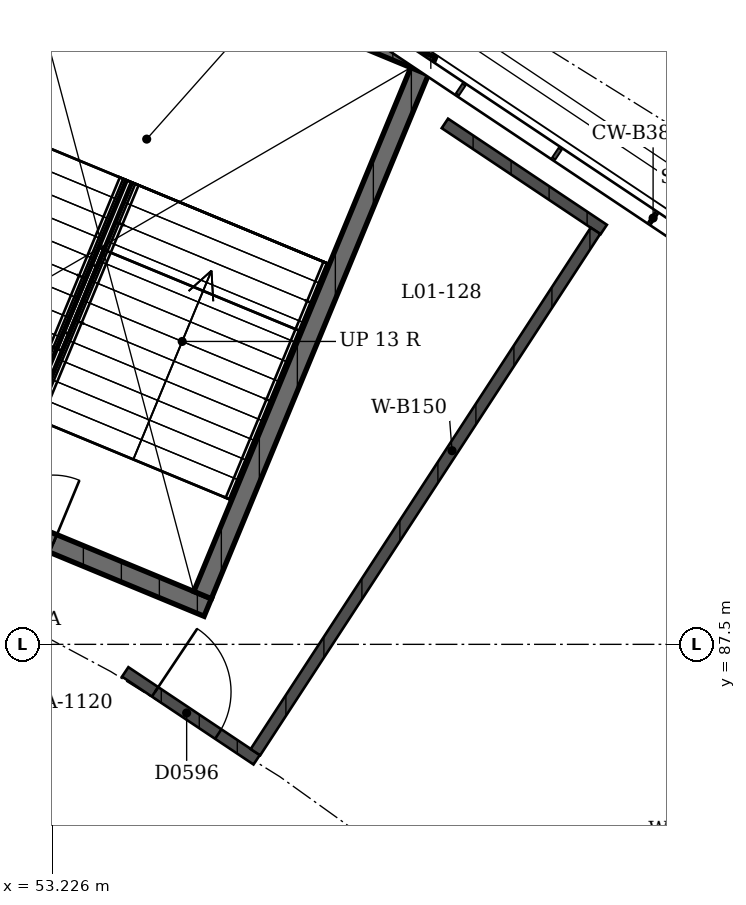
"""IFC4 building model, lengths in metres.
Left out: names, types, materials, properties, quantities, classifications, styles, units other than length and angle.
Written with IfcOpenShell. Run it as: python <this file> out.ifc"""

import sys

from ifc_helpers import new_model, si_unit, direction, frame, frame_2d, origin, place, context, subcontext, project, spatial, rectangle, extrude, element, fill, save


model = new_model("IFC4")
c1 = context("Model", 3, precision=1e-05, world=origin(), true_north=direction((0.0, 1.0)))
c2 = subcontext(c1, "Body", "Model", "MODEL_VIEW")
j1 = project(units=[si_unit("LENGTHUNIT", "METRE"), si_unit("PLANEANGLEUNIT", "RADIAN")], contexts=[c1])
p1 = place(None, origin())
s1 = spatial("IfcSite", under=j1, at=p1, CompositionType="ELEMENT")
p2 = place(p1, origin())
s2 = spatial("IfcBuilding", under=s1, at=p2, CompositionType="ELEMENT")
p3 = place(p2, frame((0.0, 0.0, 4.5)))
s3 = spatial("IfcBuildingStorey", under=s2, at=p3, CompositionType="ELEMENT", Elevation=4.5)
p4 = place(p3, frame((55.274, 87.985, 0.0), z_axis=(0.0, 0.0, 1.0), x_axis=(-0.923877480578, 0.382688386133, 0.0)))
e1 = element("IfcWall", 1, at=p4, inside=s3, PredefinedType="SHEAR", context=c2, shape_type="SweptSolid", body=[
    extrude(rectangle(XDim=12.15, YDim=0.25, at=frame_2d((6.075, 0.0))), origin(), (0.0, 0.0, 1.0), 4.09),
])
p5 = place(p4, frame((2.2, 0.0, 0.0)))
e2 = element("IfcOpeningElement", 2, at=p5, cuts=e1, PredefinedType="OPENING", context=c2, shape_type="SweptSolid", body=[
    extrude(rectangle(XDim=1.8, YDim=2.1, at=frame_2d((0.9, 1.05))), frame((0.0, 0.125, 0.0), z_axis=(0.0, -1.0, 0.0), x_axis=(1.0, 0.0, 0.0)), (0.0, 0.0, 1.0), 0.25),
])
p6 = place(p4, frame((8.15, 0.0, 0.0)))
e3 = element("IfcOpeningElement", 3, at=p6, cuts=e1, PredefinedType="OPENING", context=c2, shape_type="SweptSolid", body=[
    extrude(rectangle(XDim=1.8, YDim=2.1, at=frame_2d((0.9, 1.05))), frame((0.0, 0.125, 0.0), z_axis=(0.0, -1.0, 0.0), x_axis=(1.0, 0.0, 0.0)), (0.0, 0.0, 1.0), 0.25),
])
p7 = place(p3, frame((58.224, 95.108, 0.0), z_axis=(0.0, 0.0, 1.0), x_axis=(-0.923884584817, 0.382671234792, 0.0)))
e4 = element("IfcWall", 4, at=p7, inside=s3, PredefinedType="SHEAR", context=c2, shape_type="SweptSolid", body=[
    extrude(rectangle(XDim=12.15, YDim=0.25, at=frame_2d((6.075, 0.0))), origin(), (0.0, 0.0, 1.0), 4.09),
])
p8 = place(p3, frame((55.206, 88.148, 0.0), z_axis=(0.0, 0.0, 1.0), x_axis=(0.382664910245, 0.923887204407, 0.0)))
e5 = element("IfcWall", 5, at=p8, inside=s3, PredefinedType="SHEAR", context=c2, shape_type="SweptSolid", body=[
    extrude(rectangle(XDim=7.46, YDim=0.25, at=frame_2d((3.73, 0.0))), origin(), (0.0, 0.0, 1.0), 4.09),
])
p9 = place(p3, frame((54.188, 87.138, 0.0), z_axis=(0.0, 0.0, 1.0), x_axis=(0.831435859109, -0.555620744921, 0.0)))
e6 = element("IfcWall", 6, at=p9, inside=s3, PredefinedType="SOLIDWALL", context=c2, shape_type="SweptSolid", body=[
    extrude(rectangle(XDim=2.08, YDim=0.15, at=frame_2d((1.04, 0.0))), origin(), (0.0, 0.0, 1.0), 3.0),
])
p10 = place(p9, frame((0.472, 0.0, 0.0)))
e7 = element("IfcOpeningElement", 7, at=p10, cuts=e6, PredefinedType="OPENING", context=c2, shape_type="SweptSolid", body=[
    extrude(rectangle(XDim=1.0, YDim=2.1, at=frame_2d((0.5, 1.05))), frame((0.0, 0.075, 0.0), z_axis=(0.0, -1.0, 0.0), x_axis=(1.0, 0.0, 0.0)), (0.0, 0.0, 1.0), 0.15),
])
p11 = place(p3, frame((58.394, 94.354, 0.0), z_axis=(0.0, 0.0, 1.0), x_axis=(0.83145207432, -0.555596479569, 0.0)))
e8 = element("IfcWall", 8, at=p11, inside=s3, PredefinedType="SOLIDWALL", context=c2, shape_type="SweptSolid", body=[
    extrude(rectangle(XDim=2.513, YDim=0.15, at=frame_2d((1.257, 0.0))), origin(), (0.0, 0.0, 1.0), 3.0),
])
p12 = place(p3, frame((55.902, 86.081, 0.0), z_axis=(0.0, 0.0, 1.0), x_axis=(0.546272327191, 0.837607631618, 0.0)))
e9 = element("IfcWall", 9, at=p12, inside=s3, PredefinedType="SOLIDWALL", context=c2, shape_type="SweptSolid", body=[
    extrude(rectangle(XDim=8.19, YDim=0.15, at=frame_2d((4.095, 0.0))), origin(), (0.0, 0.0, 1.0), 3.0),
])
p13 = place(p5, origin())
e10 = element("IfcDoor", 10, at=p13, inside=s3, OperationType="DOUBLE_DOOR_SINGLE_SWING", PredefinedType="DOOR", context=c2, shape_type="SweptSolid", body=[
    extrude(rectangle(XDim=1.8, YDim=2.1, at=frame_2d((0.9, 1.05))), frame((0.0, 0.025, 0.0), z_axis=(0.0, -1.0, 0.0), x_axis=(1.0, 0.0, 0.0)), (0.0, 0.0, 1.0), 0.05),
])
fill(e2, e10)
p14 = place(p10, origin())
e11 = element("IfcDoor", 11, at=p14, inside=s3, OperationType="SINGLE_SWING_RIGHT", PredefinedType="DOOR", context=c2, shape_type="SweptSolid", body=[
    extrude(rectangle(XDim=1.0, YDim=2.1, at=frame_2d((0.5, 1.05))), frame((0.0, 0.025, 0.0), z_axis=(0.0, -1.0, 0.0), x_axis=(1.0, 0.0, 0.0)), (0.0, 0.0, 1.0), 0.05),
])
fill(e7, e11)
save(model, sys.argv[1])
